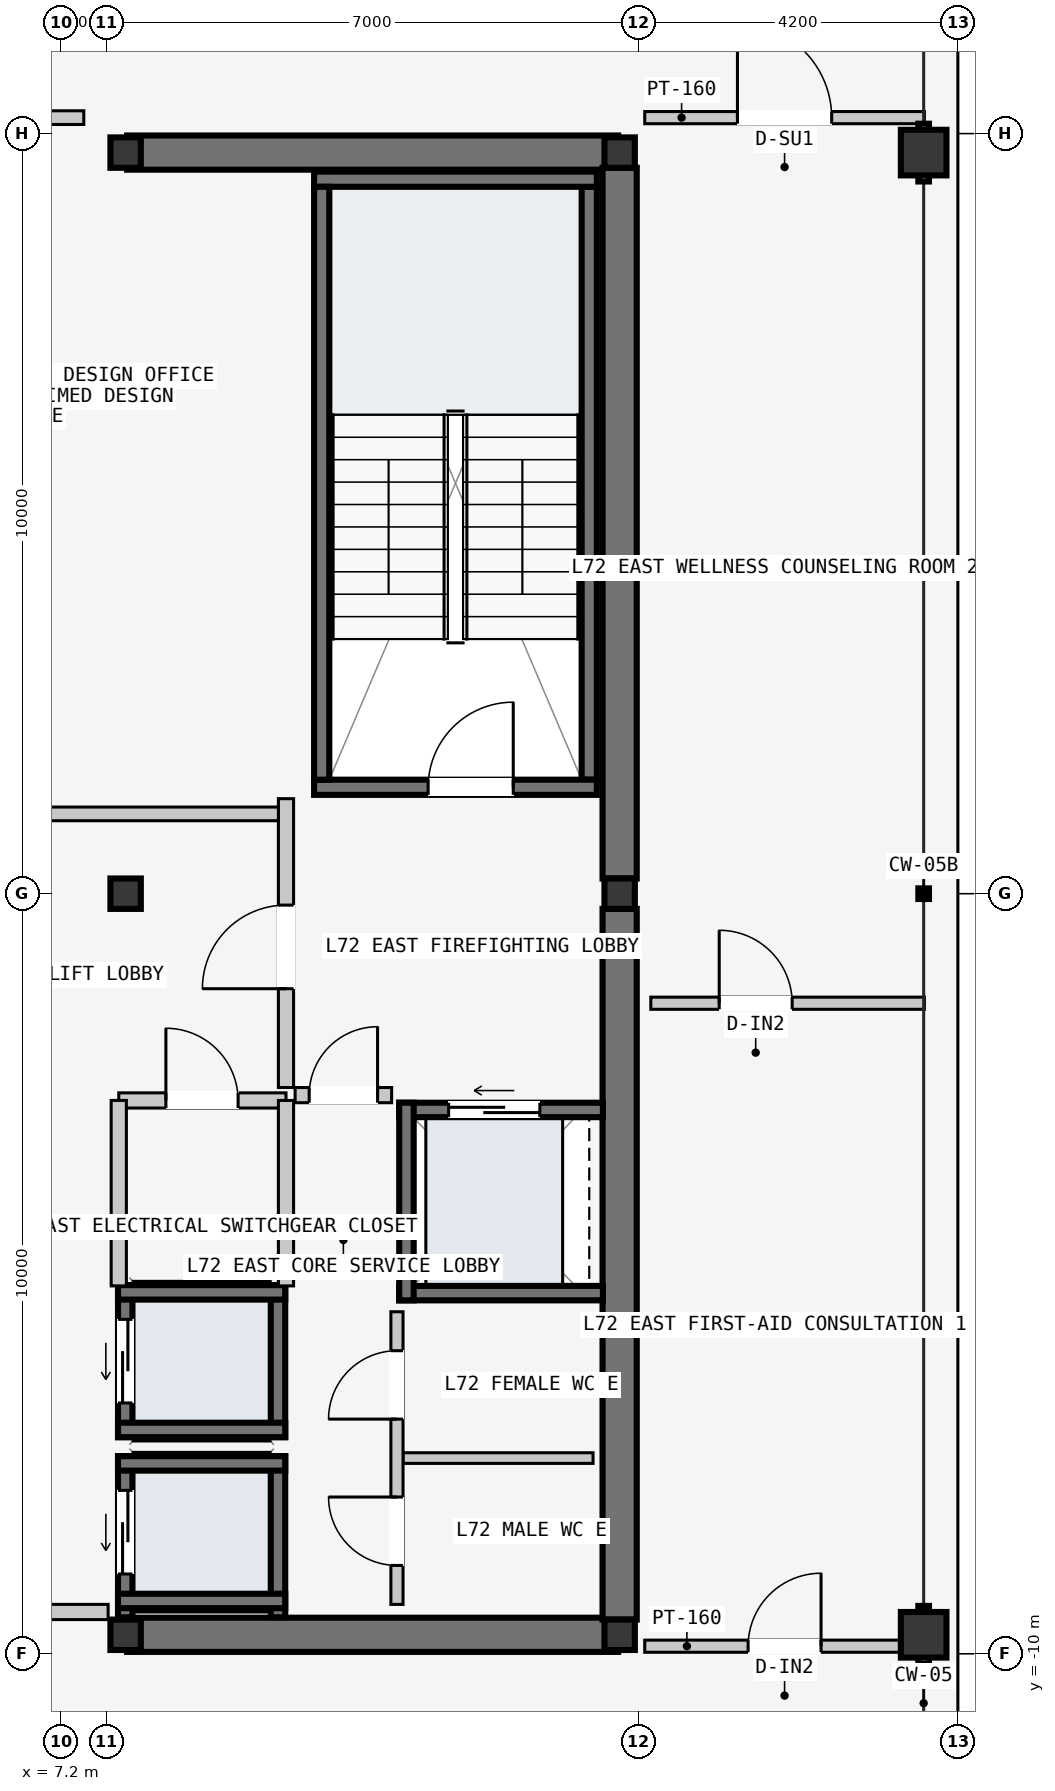
"""IFC4 building model, lengths in metres.
Left out: names, types, materials, properties, quantities, classifications, styles, units other than length and angle.
Written with IfcOpenShell. Run it as: python <this file> out.ifc"""

import sys

from ifc_helpers import new_model, si_unit, direction, frame, frame_2d, origin, origin_2d, place, context, subcontext, project, spatial, rectangle, hollow_rectangle, i_section, extrude, element, fill, save


model = new_model("IFC4")
c1 = context("Model", 3, precision=1e-05, world=origin(), true_north=direction((0.0, 1.0)))
c2 = subcontext(c1, "Body", "Model", "MODEL_VIEW")
j1 = project(units=[si_unit("LENGTHUNIT", "METRE"), si_unit("PLANEANGLEUNIT", "RADIAN")], contexts=[c1])
p1 = place(None, origin())
s1 = spatial("IfcSite", under=j1, at=p1, CompositionType="ELEMENT")
p2 = place(p1, origin())
s2 = spatial("IfcBuilding", under=s1, at=p2, CompositionType="ELEMENT")
p3 = place(p2, frame((0.0, 0.0, 272.4)))
s3 = spatial("IfcBuildingStorey", under=s2, at=p3, CompositionType="ELEMENT", Elevation=272.4)
for number, where, z_axis, x_axis in (
    (1, (8.07, -9.75, -0.2), (0.0, 0.0, 1.0), (1.0, 0.0, 0.0)),
    (2, (8.07, 9.75, -0.2), (0.0, 0.0, 1.0), (1.0, 0.0, 0.0)),
):
    element("IfcWall", number, at=place(p3, frame(where, z_axis=z_axis, x_axis=x_axis)), inside=s3, PredefinedType="SHEAR", context=c2, shape_type="SweptSolid", body=[
        extrude(rectangle(XDim=6.46, YDim=0.45, at=frame_2d((3.23, 0.0))), origin(), (0.0, 0.0, 1.0), 3.6),
    ])
for number, where, z_axis, x_axis in (
    (3, (14.55, -9.55, -0.2), (0.0, 0.0, 1.0), (0.0, 1.0, 0.0)),
    (4, (14.55, 0.2, -0.2), (0.0, 0.0, 1.0), (0.0, 1.0, 0.0)),
):
    element("IfcWall", number, at=place(p3, frame(where, z_axis=z_axis, x_axis=x_axis)), inside=s3, PredefinedType="SHEAR", context=c2, shape_type="SweptSolid", body=[
        extrude(rectangle(XDim=9.35, YDim=0.45, at=frame_2d((4.675, 0.0))), origin(), (0.0, 0.0, 1.0), 3.6),
    ])
p4 = place(p3, frame((14.15, 1.5, -0.2), z_axis=(0.0, 0.0, 1.0), x_axis=(0.0, 1.0, 0.0)))
e5 = element("IfcWall", 5, at=p4, inside=s3, PredefinedType="SOLIDWALL", context=c2, shape_type="SweptSolid", body=[
    extrude(rectangle(XDim=7.8, YDim=0.2, at=frame_2d((3.9, 0.0))), origin(), (0.0, 0.0, 1.0), 3.6),
])
p5 = place(p3, frame((10.53, 1.4, -0.2), z_axis=(0.0, 0.0, 1.0), x_axis=(1.0, 0.0, 0.0)))
e6 = element("IfcWall", 6, at=p5, inside=s3, PredefinedType="SOLIDWALL", context=c2, shape_type="SweptSolid", body=[
    extrude(rectangle(XDim=3.72, YDim=0.2, at=frame_2d((1.86, 0.0))), origin(), (0.0, 0.0, 1.0), 3.6),
])
p6 = place(p5, frame((1.5, 0.0, 0.2)))
e7 = element("IfcOpeningElement", 7, at=p6, cuts=e6, PredefinedType="OPENING", context=c2, shape_type="SweptSolid", body=[
    extrude(rectangle(XDim=1.12, YDim=2.18, at=frame_2d((0.56, 1.09))), frame((0.0, 0.11, 0.0), z_axis=(0.0, -1.0, 0.0), x_axis=(1.0, 0.0, 0.0)), (0.0, 0.0, 1.0), 0.22),
])
p7 = place(p3, frame((10.53, 9.4, -0.2), z_axis=(0.0, 0.0, 1.0), x_axis=(1.0, 0.0, 0.0)))
e8 = element("IfcWall", 8, at=p7, inside=s3, PredefinedType="SOLIDWALL", context=c2, shape_type="SweptSolid", body=[
    extrude(rectangle(XDim=3.72, YDim=0.2, at=frame_2d((1.86, 0.0))), origin(), (0.0, 0.0, 1.0), 3.6),
])
p8 = place(p3, frame((10.63, 1.5, -0.2), z_axis=(0.0, 0.0, 1.0), x_axis=(0.0, 1.0, 0.0)))
e9 = element("IfcWall", 9, at=p8, inside=s3, PredefinedType="SOLIDWALL", context=c2, shape_type="SweptSolid", body=[
    extrude(rectangle(XDim=7.8, YDim=0.2, at=frame_2d((3.9, 0.0))), origin(), (0.0, 0.0, 1.0), 3.6),
])
for number, where, z_axis, x_axis in (
    (10, (8.05, -9.75, 0.0), (0.0, 0.0, 1.0), (1.0, 0.0, 0.0)),
    (11, (8.05, 0.0, 0.0), (0.0, 0.0, 1.0), (1.0, 0.0, 0.0)),
    (12, (8.05, 9.75, 0.0), (0.0, 0.0, 1.0), (1.0, 0.0, 0.0)),
    (13, (14.55, -9.75, 0.0), (0.0, 0.0, 1.0), (1.0, 0.0, 0.0)),
    (14, (14.55, 0.0, 0.0), (0.0, 0.0, 1.0), (1.0, 0.0, 0.0)),
    (15, (14.55, 9.75, 0.0), (0.0, 0.0, 1.0), (1.0, 0.0, 0.0)),
):
    element("IfcColumn", number, at=place(p3, frame(where, z_axis=z_axis, x_axis=x_axis)), inside=s3, PredefinedType="COLUMN", context=c2, shape_type="SweptSolid", body=[
        extrude(i_section(OverallWidth=0.4, OverallDepth=0.4, WebThickness=0.013, FlangeThickness=0.021, at=origin_2d()), origin(), (0.0, 0.0, 1.0), 3.6),
    ])
for number, where, z_axis, x_axis in (
    (16, (18.55, -9.75, 0.0), (0.0, 0.0, 1.0), (0.0, 1.0, 0.0)),
    (17, (18.55, 9.75, 0.0), (0.0, 0.0, 1.0), (0.0, 1.0, 0.0)),
):
    element("IfcColumn", number, at=place(p3, frame(where, z_axis=z_axis, x_axis=x_axis)), inside=s3, PredefinedType="COLUMN", context=c2, shape_type="SweptSolid", body=[
        extrude(hollow_rectangle(XDim=0.6, YDim=0.6, WallThickness=0.025, at=origin_2d()), origin(), (0.0, 0.0, 1.0), 3.6),
    ])
p9 = place(p3, frame((8.045, -9.52, -0.2), z_axis=(0.0, 0.0, 1.0), x_axis=(0.0, 1.0, 0.0)))
e18 = element("IfcWall", 18, at=p9, inside=s3, PredefinedType="SOLIDWALL", context=c2, shape_type="SweptSolid", body=[
    extrude(rectangle(XDim=2.12, YDim=0.19, at=frame_2d((1.06, 0.0))), origin(), (0.0, 0.0, 1.0), 3.6),
])
p10 = place(p9, frame((0.57, 0.0, 0.2)))
e19 = element("IfcOpeningElement", 19, at=p10, cuts=e18, PredefinedType="OPENING", context=c2, shape_type="SweptSolid", body=[
    extrude(rectangle(XDim=1.1, YDim=2.2, at=frame_2d((0.55, 1.1))), frame((0.0, 0.105, 0.0), z_axis=(0.0, -1.0, 0.0), x_axis=(1.0, 0.0, 0.0)), (0.0, 0.0, 1.0), 0.21),
])
p11 = place(p3, frame((10.055, -9.52, -0.2), z_axis=(0.0, 0.0, 1.0), x_axis=(0.0, 1.0, 0.0)))
e20 = element("IfcWall", 20, at=p11, inside=s3, PredefinedType="SOLIDWALL", context=c2, shape_type="SweptSolid", body=[
    extrude(rectangle(XDim=2.12, YDim=0.19, at=frame_2d((1.06, 0.0))), origin(), (0.0, 0.0, 1.0), 3.6),
])
for number, where, z_axis, x_axis in (
    (21, (7.95, -7.495, -0.2), (0.0, 0.0, 1.0), (1.0, 0.0, 0.0)),
    (22, (7.95, -9.305, -0.2), (0.0, 0.0, 1.0), (1.0, 0.0, 0.0)),
):
    element("IfcWall", number, at=place(p3, frame(where, z_axis=z_axis, x_axis=x_axis)), inside=s3, PredefinedType="SOLIDWALL", context=c2, shape_type="SweptSolid", body=[
        extrude(rectangle(XDim=2.2, YDim=0.19, at=frame_2d((1.1, 0.0))), origin(), (0.0, 0.0, 1.0), 3.6),
    ])
p12 = place(p3, frame((8.045, -7.15, -0.2), z_axis=(0.0, 0.0, 1.0), x_axis=(0.0, 1.0, 0.0)))
e23 = element("IfcWall", 23, at=p12, inside=s3, PredefinedType="SOLIDWALL", context=c2, shape_type="SweptSolid", body=[
    extrude(rectangle(XDim=2.0, YDim=0.19, at=frame_2d((1.0, 0.0))), origin(), (0.0, 0.0, 1.0), 3.6),
])
p13 = place(p12, frame((0.45, 0.0, 0.2)))
e24 = element("IfcOpeningElement", 24, at=p13, cuts=e23, PredefinedType="OPENING", context=c2, shape_type="SweptSolid", body=[
    extrude(rectangle(XDim=1.1, YDim=2.2, at=frame_2d((0.55, 1.1))), frame((0.0, 0.105, 0.0), z_axis=(0.0, -1.0, 0.0), x_axis=(1.0, 0.0, 0.0)), (0.0, 0.0, 1.0), 0.21),
])
p14 = place(p3, frame((10.055, -7.15, -0.2), z_axis=(0.0, 0.0, 1.0), x_axis=(0.0, 1.0, 0.0)))
e25 = element("IfcWall", 25, at=p14, inside=s3, PredefinedType="SOLIDWALL", context=c2, shape_type="SweptSolid", body=[
    extrude(rectangle(XDim=2.0, YDim=0.19, at=frame_2d((1.0, 0.0))), origin(), (0.0, 0.0, 1.0), 3.6),
])
for number, where, z_axis, x_axis in (
    (26, (7.95, -5.245, -0.2), (0.0, 0.0, 1.0), (1.0, 0.0, 0.0)),
    (27, (7.95, -7.055, -0.2), (0.0, 0.0, 1.0), (1.0, 0.0, 0.0)),
):
    element("IfcWall", number, at=place(p3, frame(where, z_axis=z_axis, x_axis=x_axis)), inside=s3, PredefinedType="SOLIDWALL", context=c2, shape_type="SweptSolid", body=[
        extrude(rectangle(XDim=2.2, YDim=0.19, at=frame_2d((1.1, 0.0))), origin(), (0.0, 0.0, 1.0), 3.6),
    ])
p15 = place(p3, frame((11.65, -2.845, -0.2), z_axis=(0.0, 0.0, 1.0), x_axis=(1.0, 0.0, 0.0)))
e28 = element("IfcWall", 28, at=p15, inside=s3, PredefinedType="SOLIDWALL", context=c2, shape_type="SweptSolid", body=[
    extrude(rectangle(XDim=2.68, YDim=0.19, at=frame_2d((1.34, 0.0))), origin(), (0.0, 0.0, 1.0), 3.6),
])
p16 = place(p15, frame((0.65, 0.0, 0.2)))
e29 = element("IfcOpeningElement", 29, at=p16, cuts=e28, PredefinedType="OPENING", context=c2, shape_type="SweptSolid", body=[
    extrude(rectangle(XDim=1.2, YDim=2.2, at=frame_2d((0.6, 1.1))), frame((0.0, 0.105, 0.0), z_axis=(0.0, -1.0, 0.0), x_axis=(1.0, 0.0, 0.0)), (0.0, 0.0, 1.0), 0.21),
])
p17 = place(p3, frame((11.65, -5.255, -0.2), z_axis=(0.0, 0.0, 1.0), x_axis=(1.0, 0.0, 0.0)))
e30 = element("IfcWall", 30, at=p17, inside=s3, PredefinedType="SOLIDWALL", context=c2, shape_type="SweptSolid", body=[
    extrude(rectangle(XDim=2.68, YDim=0.19, at=frame_2d((1.34, 0.0))), origin(), (0.0, 0.0, 1.0), 3.6),
])
p18 = place(p3, frame((11.745, -5.35, -0.2), z_axis=(0.0, 0.0, 1.0), x_axis=(0.0, 1.0, 0.0)))
e31 = element("IfcWall", 31, at=p18, inside=s3, PredefinedType="SOLIDWALL", context=c2, shape_type="SweptSolid", body=[
    extrude(rectangle(XDim=2.6, YDim=0.19, at=frame_2d((1.3, 0.0))), origin(), (0.0, 0.0, 1.0), 3.6),
])
p19 = place(p3, frame((6.02, -9.45, 0.0), z_axis=(0.0, 0.0, 1.0), x_axis=(1.0, 0.0, 0.0)))
e32 = element("IfcWall", 32, at=p19, inside=s3, PredefinedType="PARTITIONING", context=c2, shape_type="SweptSolid", body=[
    extrude(rectangle(XDim=1.8, YDim=0.2, at=frame_2d((0.9, 0.0))), origin(), (0.0, 0.0, 1.0), 3.4),
])
p20 = place(p3, frame((10.16, -2.55, 0.0), z_axis=(0.0, 0.0, 1.0), x_axis=(0.0, 1.0, 0.0)))
e33 = element("IfcWall", 33, at=p20, inside=s3, PredefinedType="PARTITIONING", context=c2, shape_type="SweptSolid", body=[
    extrude(rectangle(XDim=3.8, YDim=0.2, at=frame_2d((1.9, 0.0))), origin(), (0.0, 0.0, 1.0), 3.4),
])
p21 = place(p20, frame((1.3, 0.0, 0.0)))
e34 = element("IfcOpeningElement", 34, at=p21, cuts=e33, PredefinedType="OPENING", context=c2, shape_type="SweptSolid", body=[
    extrude(rectangle(XDim=1.1, YDim=2.15, at=frame_2d((0.55, 1.075))), frame((0.0, 0.11, 0.0), z_axis=(0.0, -1.0, 0.0), x_axis=(1.0, 0.0, 0.0)), (0.0, 0.0, 1.0), 0.22),
])
p22 = place(p3, frame((10.28, -2.65, 0.0), z_axis=(0.0, 0.0, 1.0), x_axis=(1.0, 0.0, 0.0)))
e35 = element("IfcWall", 35, at=p22, inside=s3, PredefinedType="PARTITIONING", context=c2, shape_type="SweptSolid", body=[
    extrude(rectangle(XDim=1.27, YDim=0.2, at=frame_2d((0.635, 0.0))), origin(), (0.0, 0.0, 1.0), 3.4),
])
p23 = place(p22, frame((0.185, 0.0, 0.0)))
e36 = element("IfcOpeningElement", 36, at=p23, cuts=e35, PredefinedType="OPENING", context=c2, shape_type="SweptSolid", body=[
    extrude(rectangle(XDim=0.9, YDim=2.15, at=frame_2d((0.45, 1.075))), frame((0.0, 0.11, 0.0), z_axis=(0.0, -1.0, 0.0), x_axis=(1.0, 0.0, 0.0)), (0.0, 0.0, 1.0), 0.22),
])
p24 = place(p3, frame((7.96, -2.72, 0.0), z_axis=(0.0, 0.0, 1.0), x_axis=(1.0, 0.0, 0.0)))
e37 = element("IfcWall", 37, at=p24, inside=s3, PredefinedType="PARTITIONING", context=c2, shape_type="SweptSolid", body=[
    extrude(rectangle(XDim=2.2, YDim=0.2, at=frame_2d((1.1, 0.0))), origin(), (0.0, 0.0, 1.0), 3.4),
])
p25 = place(p24, frame((0.62, 0.0, 0.0)))
e38 = element("IfcOpeningElement", 38, at=p25, cuts=e37, PredefinedType="OPENING", context=c2, shape_type="SweptSolid", body=[
    extrude(rectangle(XDim=0.95, YDim=2.1, at=frame_2d((0.475, 1.05))), frame((0.0, 0.11, 0.0), z_axis=(0.0, -1.0, 0.0), x_axis=(1.0, 0.0, 0.0)), (0.0, 0.0, 1.0), 0.22),
])
for number, where, z_axis, x_axis in (
    (39, (7.96, -5.16, 0.0), (0.0, 0.0, 1.0), (0.0, 1.0, 0.0)),
    (40, (10.16, -5.16, 0.0), (0.0, 0.0, 1.0), (0.0, 1.0, 0.0)),
):
    element("IfcWall", number, at=place(p3, frame(where, z_axis=z_axis, x_axis=x_axis)), inside=s3, PredefinedType="PARTITIONING", context=c2, shape_type="SweptSolid", body=[
        extrude(rectangle(XDim=2.44, YDim=0.2, at=frame_2d((1.22, 0.0))), origin(), (0.0, 0.0, 1.0), 3.4),
    ])
p26 = place(p3, frame((11.7, -7.425, 0.0), z_axis=(0.0, 0.0, 1.0), x_axis=(1.0, 0.0, 0.0)))
e41 = element("IfcWall", 41, at=p26, inside=s3, PredefinedType="PARTITIONING", context=c2, shape_type="SweptSolid", body=[
    extrude(rectangle(XDim=2.5, YDim=0.14, at=frame_2d((1.25, 0.0))), origin(), (0.0, 0.0, 1.0), 3.4),
])
p27 = place(p3, frame((11.62, -9.35, 0.0), z_axis=(0.0, 0.0, 1.0), x_axis=(0.0, 1.0, 0.0)))
e42 = element("IfcWall", 42, at=p27, inside=s3, PredefinedType="PARTITIONING", context=c2, shape_type="SweptSolid", body=[
    extrude(rectangle(XDim=3.85, YDim=0.16, at=frame_2d((1.925, 0.0))), origin(), (0.0, 0.0, 1.0), 3.4),
])
p28 = place(p27, frame((0.512, 0.0, 0.0)))
e43 = element("IfcOpeningElement", 43, at=p28, cuts=e42, PredefinedType="OPENING", context=c2, shape_type="SweptSolid", body=[
    extrude(rectangle(XDim=0.9, YDim=2.15, at=frame_2d((0.45, 1.075))), frame((0.0, 0.09, 0.0), z_axis=(0.0, -1.0, 0.0), x_axis=(1.0, 0.0, 0.0)), (0.0, 0.0, 1.0), 0.18),
])
p29 = place(p27, frame((2.438, 0.0, 0.0)))
e44 = element("IfcOpeningElement", 44, at=p29, cuts=e42, PredefinedType="OPENING", context=c2, shape_type="SweptSolid", body=[
    extrude(rectangle(XDim=0.9, YDim=2.15, at=frame_2d((0.45, 1.075))), frame((0.0, 0.09, 0.0), z_axis=(0.0, -1.0, 0.0), x_axis=(1.0, 0.0, 0.0)), (0.0, 0.0, 1.0), 0.18),
])
p30 = place(p3, frame((3.01, 1.05, 0.0), z_axis=(0.0, 0.0, 1.0), x_axis=(1.0, 0.0, 0.0)))
e45 = element("IfcWall", 45, at=p30, inside=s3, PredefinedType="PARTITIONING", context=c2, shape_type="SweptSolid", body=[
    extrude(rectangle(XDim=7.05, YDim=0.18, at=frame_2d((3.525, 0.0))), origin(), (0.0, 0.0, 1.0), 3.4),
])
p31 = place(p3, frame((3.01, 10.21, 0.0), z_axis=(0.0, 0.0, 1.0), x_axis=(1.0, 0.0, 0.0)))
e46 = element("IfcWall", 46, at=p31, inside=s3, PredefinedType="PARTITIONING", context=c2, shape_type="SweptSolid", body=[
    extrude(rectangle(XDim=4.49, YDim=0.18, at=frame_2d((2.245, 0.0))), origin(), (0.0, 0.0, 1.0), 3.4),
])
p32 = place(p3, frame((14.88, 10.21, 0.0), z_axis=(0.0, 0.0, 1.0), x_axis=(1.0, 0.0, 0.0)))
e47 = element("IfcWall", 47, at=p32, inside=s3, PredefinedType="PARTITIONING", context=c2, shape_type="SweptSolid", body=[
    extrude(rectangle(XDim=3.68, YDim=0.16, at=frame_2d((1.84, 0.0))), origin(), (0.0, 0.0, 1.0), 3.4),
])
p33 = place(p32, frame((1.22, 0.0, 0.0)))
e48 = element("IfcOpeningElement", 48, at=p33, cuts=e47, PredefinedType="OPENING", context=c2, shape_type="SweptSolid", body=[
    extrude(rectangle(XDim=1.24, YDim=2.24, at=frame_2d((0.62, 1.12))), frame((0.0, 0.09, 0.0), z_axis=(0.0, -1.0, 0.0), x_axis=(1.0, 0.0, 0.0)), (0.0, 0.0, 1.0), 0.18),
])
p34 = place(p3, frame((14.88, -9.9, 0.0), z_axis=(0.0, 0.0, 1.0), x_axis=(1.0, 0.0, 0.0)))
e49 = element("IfcWall", 49, at=p34, inside=s3, PredefinedType="PARTITIONING", context=c2, shape_type="SweptSolid", body=[
    extrude(rectangle(XDim=3.68, YDim=0.16, at=frame_2d((1.84, 0.0))), origin(), (0.0, 0.0, 1.0), 3.4),
])
p35 = place(p34, frame((1.36, 0.0, 0.0)))
e50 = element("IfcOpeningElement", 50, at=p35, cuts=e49, PredefinedType="OPENING", context=c2, shape_type="SweptSolid", body=[
    extrude(rectangle(XDim=0.96, YDim=2.18, at=frame_2d((0.48, 1.09))), frame((0.0, 0.09, 0.0), z_axis=(0.0, -1.0, 0.0), x_axis=(1.0, 0.0, 0.0)), (0.0, 0.0, 1.0), 0.18),
])
p36 = place(p3, frame((14.96, -1.441, 0.0), z_axis=(0.0, 0.0, 1.0), x_axis=(1.0, 0.0, 0.0)))
e51 = element("IfcWall", 51, at=p36, inside=s3, PredefinedType="PARTITIONING", context=c2, shape_type="SweptSolid", body=[
    extrude(rectangle(XDim=3.6, YDim=0.16, at=frame_2d((1.8, 0.0))), origin(), (0.0, 0.0, 1.0), 3.4),
])
p37 = place(p36, frame((0.9, 0.0, 0.0)))
e52 = element("IfcOpeningElement", 52, at=p37, cuts=e51, PredefinedType="OPENING", context=c2, shape_type="SweptSolid", body=[
    extrude(rectangle(XDim=0.96, YDim=2.18, at=frame_2d((0.48, 1.09))), frame((0.0, 0.09, 0.0), z_axis=(0.0, -1.0, 0.0), x_axis=(1.0, 0.0, 0.0)), (0.0, 0.0, 1.0), 0.18),
])
p38 = place(p6, origin())
e53 = element("IfcDoor", 53, at=p38, inside=s3, OperationType="SINGLE_SWING_RIGHT", PredefinedType="DOOR", context=c2, shape_type="SweptSolid", body=[
    extrude(rectangle(XDim=1.12, YDim=2.18, at=frame_2d((0.56, 1.09))), frame((0.0, 0.025, 0.0), z_axis=(0.0, -1.0, 0.0), x_axis=(1.0, 0.0, 0.0)), (0.0, 0.0, 1.0), 0.05),
])
fill(e7, e53)
p39 = place(p10, origin())
e54 = element("IfcDoor", 54, at=p39, inside=s3, OperationType="SLIDING_TO_LEFT", PredefinedType="DOOR", context=c2, shape_type="SweptSolid", body=[
    extrude(rectangle(XDim=1.1, YDim=2.2, at=frame_2d((0.55, 1.1))), frame((0.0, 0.025, 0.0), z_axis=(0.0, -1.0, 0.0), x_axis=(1.0, 0.0, 0.0)), (0.0, 0.0, 1.0), 0.05),
])
fill(e19, e54)
p40 = place(p13, origin())
e55 = element("IfcDoor", 55, at=p40, inside=s3, OperationType="SLIDING_TO_LEFT", PredefinedType="DOOR", context=c2, shape_type="SweptSolid", body=[
    extrude(rectangle(XDim=1.1, YDim=2.2, at=frame_2d((0.55, 1.1))), frame((0.0, 0.025, 0.0), z_axis=(0.0, -1.0, 0.0), x_axis=(1.0, 0.0, 0.0)), (0.0, 0.0, 1.0), 0.05),
])
fill(e24, e55)
p41 = place(p16, origin())
e56 = element("IfcDoor", 56, at=p41, inside=s3, OperationType="SLIDING_TO_LEFT", PredefinedType="DOOR", context=c2, shape_type="SweptSolid", body=[
    extrude(rectangle(XDim=1.2, YDim=2.2, at=frame_2d((0.6, 1.1))), frame((0.0, 0.025, 0.0), z_axis=(0.0, -1.0, 0.0), x_axis=(1.0, 0.0, 0.0)), (0.0, 0.0, 1.0), 0.05),
])
fill(e29, e56)
p42 = place(p21, origin())
e57 = element("IfcDoor", 57, at=p42, inside=s3, OperationType="SINGLE_SWING_LEFT", PredefinedType="DOOR", context=c2, shape_type="SweptSolid", body=[
    extrude(rectangle(XDim=1.1, YDim=2.15, at=frame_2d((0.55, 1.075))), frame((0.0, 0.025, 0.0), z_axis=(0.0, -1.0, 0.0), x_axis=(1.0, 0.0, 0.0)), (0.0, 0.0, 1.0), 0.05),
])
fill(e34, e57)
p43 = place(p23, origin())
e58 = element("IfcDoor", 58, at=p43, inside=s3, OperationType="SINGLE_SWING_RIGHT", PredefinedType="DOOR", context=c2, shape_type="SweptSolid", body=[
    extrude(rectangle(XDim=0.9, YDim=2.15, at=frame_2d((0.45, 1.075))), frame((0.0, 0.025, 0.0), z_axis=(0.0, -1.0, 0.0), x_axis=(1.0, 0.0, 0.0)), (0.0, 0.0, 1.0), 0.05),
])
fill(e36, e58)
p44 = place(p25, origin())
e59 = element("IfcDoor", 59, at=p44, inside=s3, OperationType="SINGLE_SWING_LEFT", PredefinedType="DOOR", context=c2, shape_type="SweptSolid", body=[
    extrude(rectangle(XDim=0.95, YDim=2.1, at=frame_2d((0.475, 1.05))), frame((0.0, 0.025, 0.0), z_axis=(0.0, -1.0, 0.0), x_axis=(1.0, 0.0, 0.0)), (0.0, 0.0, 1.0), 0.05),
])
fill(e38, e59)
p45 = place(p28, origin())
e60 = element("IfcDoor", 60, at=p45, inside=s3, OperationType="SINGLE_SWING_RIGHT", PredefinedType="DOOR", context=c2, shape_type="SweptSolid", body=[
    extrude(rectangle(XDim=0.9, YDim=2.15, at=frame_2d((0.45, 1.075))), frame((0.0, 0.025, 0.0), z_axis=(0.0, -1.0, 0.0), x_axis=(1.0, 0.0, 0.0)), (0.0, 0.0, 1.0), 0.05),
])
fill(e43, e60)
p46 = place(p29, origin())
e61 = element("IfcDoor", 61, at=p46, inside=s3, OperationType="SINGLE_SWING_LEFT", PredefinedType="DOOR", context=c2, shape_type="SweptSolid", body=[
    extrude(rectangle(XDim=0.9, YDim=2.15, at=frame_2d((0.45, 1.075))), frame((0.0, 0.025, 0.0), z_axis=(0.0, -1.0, 0.0), x_axis=(1.0, 0.0, 0.0)), (0.0, 0.0, 1.0), 0.05),
])
fill(e44, e61)
p47 = place(p33, origin())
e62 = element("IfcDoor", 62, at=p47, inside=s3, OperationType="SINGLE_SWING_LEFT", PredefinedType="DOOR", context=c2, shape_type="SweptSolid", body=[
    extrude(rectangle(XDim=1.24, YDim=2.24, at=frame_2d((0.62, 1.12))), frame((0.0, 0.025, 0.0), z_axis=(0.0, -1.0, 0.0), x_axis=(1.0, 0.0, 0.0)), (0.0, 0.0, 1.0), 0.05),
])
fill(e48, e62)
p48 = place(p35, origin())
e63 = element("IfcDoor", 63, at=p48, inside=s3, OperationType="SINGLE_SWING_RIGHT", PredefinedType="DOOR", context=c2, shape_type="SweptSolid", body=[
    extrude(rectangle(XDim=0.96, YDim=2.18, at=frame_2d((0.48, 1.09))), frame((0.0, 0.025, 0.0), z_axis=(0.0, -1.0, 0.0), x_axis=(1.0, 0.0, 0.0)), (0.0, 0.0, 1.0), 0.05),
])
fill(e50, e63)
p49 = place(p37, origin())
e64 = element("IfcDoor", 64, at=p49, inside=s3, OperationType="SINGLE_SWING_LEFT", PredefinedType="DOOR", context=c2, shape_type="SweptSolid", body=[
    extrude(rectangle(XDim=0.96, YDim=2.18, at=frame_2d((0.48, 1.09))), frame((0.0, 0.025, 0.0), z_axis=(0.0, -1.0, 0.0), x_axis=(1.0, 0.0, 0.0)), (0.0, 0.0, 1.0), 0.05),
])
fill(e52, e64)
save(model, sys.argv[1])
